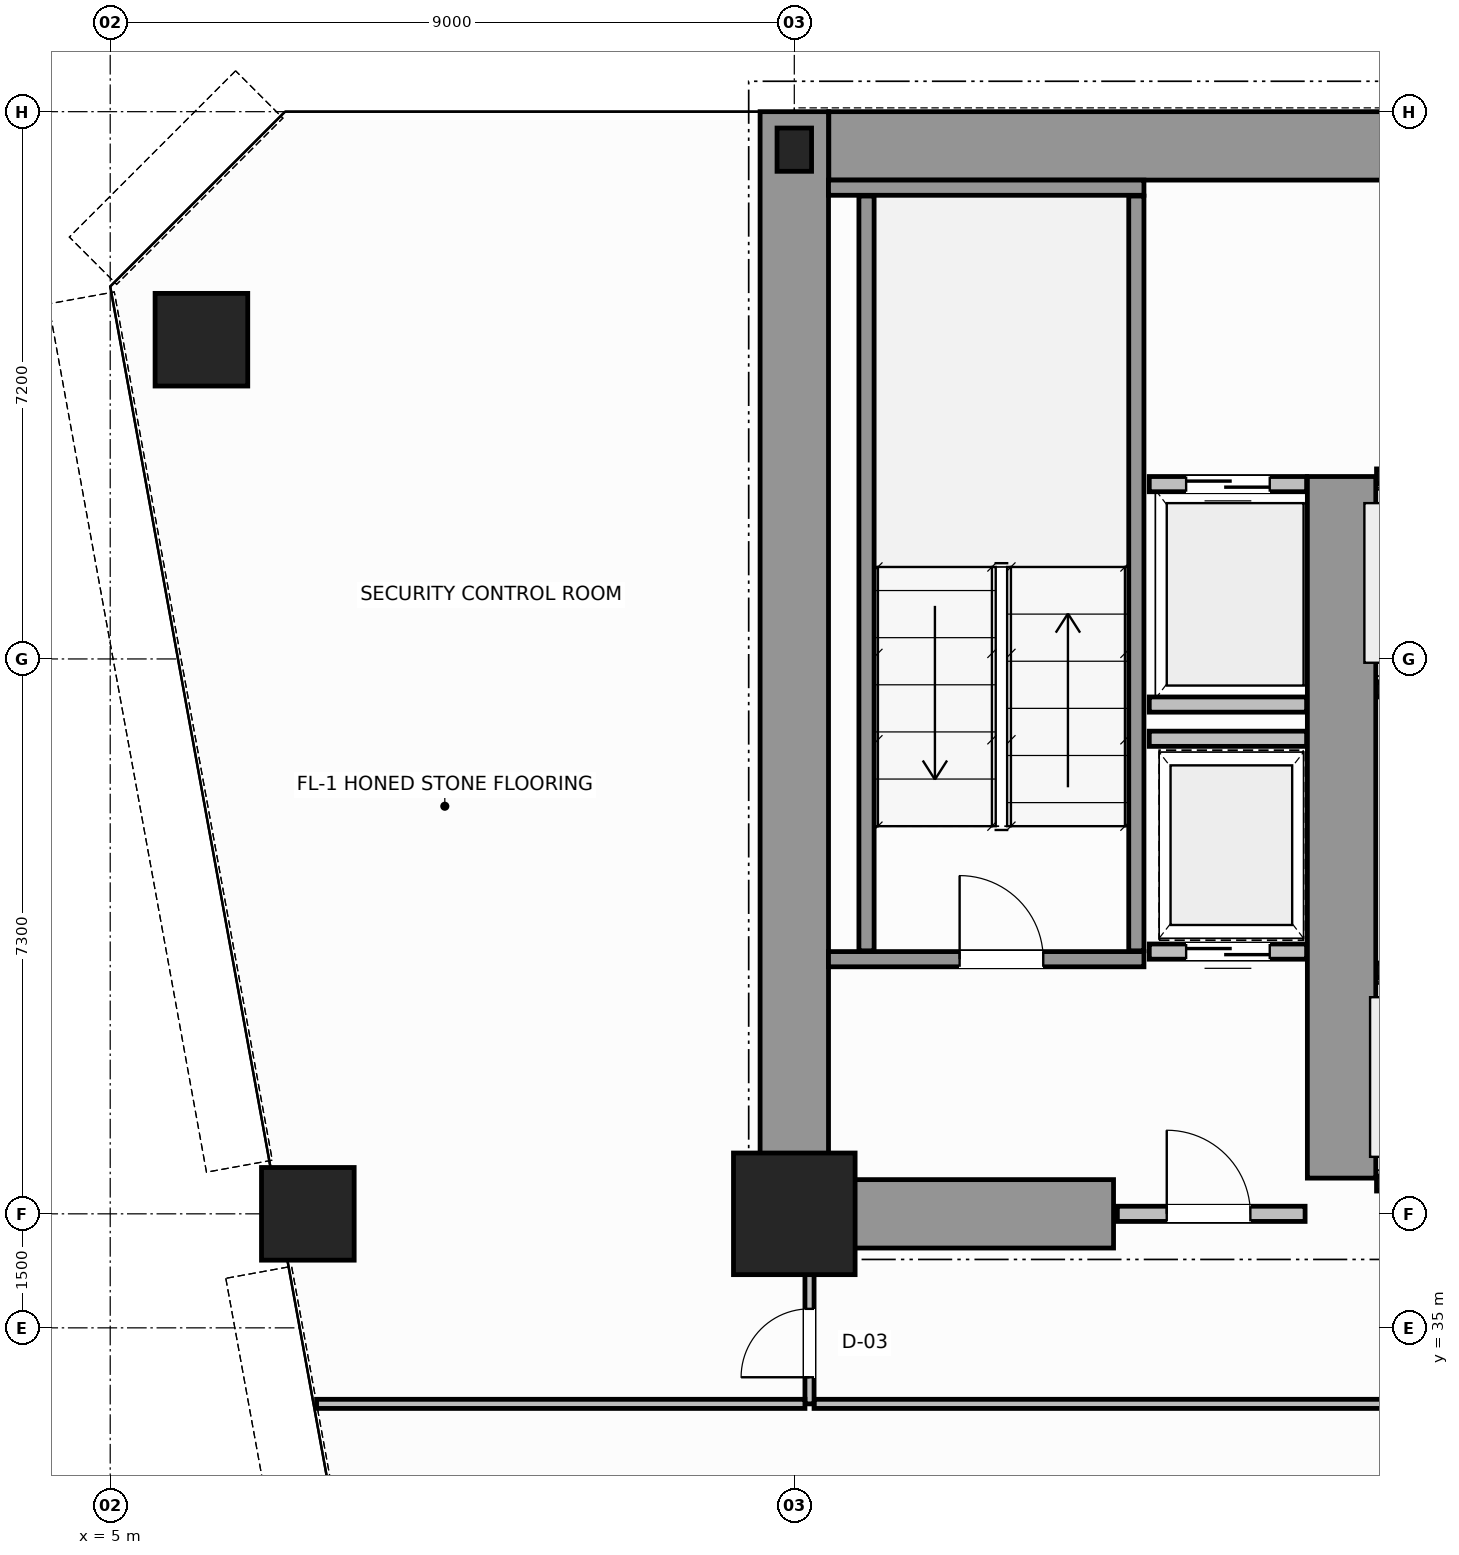
"""IFC4 building model, lengths in metres.
Left out: names, types, materials, properties, quantities, classifications, styles, units other than length and angle.
Written with IfcOpenShell. Run it as: python <this file> out.ifc"""

import sys

from ifc_helpers import new_model, si_unit, direction, frame, frame_2d, origin, origin_2d, place, context, subcontext, project, spatial, rectangle, hollow_circle, i_section, extrude, source, transform, mapped, element, fill, save


model = new_model("IFC4")
c1 = context("Model", 3, precision=1e-05, world=origin(), true_north=direction((0.0, 1.0)))
c2 = subcontext(c1, "Body", "Model", "MODEL_VIEW")
j1 = project(units=[si_unit("LENGTHUNIT", "METRE"), si_unit("PLANEANGLEUNIT", "RADIAN")], contexts=[c1])
p1 = place(None, origin())
s1 = spatial("IfcSite", under=j1, at=p1, CompositionType="ELEMENT")
p2 = place(p1, origin())
s2 = spatial("IfcBuilding", under=s1, at=p2, CompositionType="ELEMENT")
p3 = place(p2, frame((0.0, 0.0, 45.4)))
s3 = spatial("IfcBuildingStorey", under=s2, at=p3, CompositionType="ELEMENT", Elevation=45.4)
m1 = source(origin(), c2, "Body", "SweptSolid", [
    extrude(rectangle(XDim=1.6, YDim=1.6, at=origin_2d()), origin(), (0.0, 0.0, 1.0), 3.8),
])
p4 = place(p3, frame((14.0, 36.5, 0.0), z_axis=(0.0, 0.0, 1.0), x_axis=(1.0, 0.0, 0.0)))
e1 = element("IfcColumn", 1, at=p4, inside=s3, PredefinedType="COLUMN", context=c2, shape_type="MappedRepresentation", body=[
    mapped(m1, transform((0.0, 0.0, 0.0), scale=1.0)),
])
m2 = source(origin(), c2, "Body", "SweptSolid", [
    extrude(i_section(OverallWidth=0.454, OverallDepth=0.569, WebThickness=0.078, FlangeThickness=0.08, FilletRadius=0.015, at=origin_2d()), origin(), (0.0, 0.0, 1.0), 3.8),
])
p5 = place(p3, frame((14.0, 50.5, 0.0), z_axis=(0.0, 0.0, 1.0), x_axis=(1.0, 0.0, 0.0)))
e2 = element("IfcColumn", 2, at=p5, inside=s3, PredefinedType="COLUMN", context=c2, shape_type="MappedRepresentation", body=[
    mapped(m2, transform((0.0, 0.0, 0.0), scale=1.0)),
])
m3 = source(origin(), c2, "Body", "SweptSolid", [
    extrude(hollow_circle(Radius=0.61, WallThickness=0.05, at=origin_2d()), origin(), (0.0, 0.0, 1.0), 3.8),
])
for number, where, z_axis, x_axis in (
    (3, (6.2, 48.0, 0.0), (0.0, 0.0, 1.0), (1.0, 0.0, 0.0)),
    (4, (7.6, 36.5, 0.0), (0.0, 0.0, 1.0), (1.0, 0.0, 0.0)),
):
    element("IfcColumn", number, at=place(p3, frame(where, z_axis=z_axis, x_axis=x_axis)), inside=s3, PredefinedType="COLUMN", context=c2, shape_type="MappedRepresentation", body=[
        mapped(m3, transform((0.0, 0.0, 0.0), scale=1.0)),
    ])
p6 = place(p3, frame((14.454, 50.55, 0.0), z_axis=(0.0, 0.0, 1.0), x_axis=(1.0, 0.0, 0.0)))
e5 = element("IfcWall", 5, at=p6, inside=s3, PredefinedType="SHEAR", context=c2, shape_type="SweptSolid", body=[
    extrude(rectangle(XDim=19.544, YDim=0.9, at=frame_2d((9.772, 0.0))), origin(), (0.0, 0.0, 1.0), 3.8),
])
p7 = place(p3, frame((14.0, 36.5, 0.0), z_axis=(0.0, 0.0, 1.0), x_axis=(0.0, 1.0, 0.0)))
e6 = element("IfcWall", 6, at=p7, inside=s3, PredefinedType="SHEAR", context=c2, shape_type="SweptSolid", body=[
    extrude(rectangle(XDim=14.5, YDim=0.9, at=frame_2d((7.25, 0.0))), origin(), (0.0, 0.0, 1.0), 3.8),
])
p8 = place(p3, frame((14.47, 36.5, 0.0), z_axis=(0.0, 0.0, 1.0), x_axis=(1.0, 0.0, 0.0)))
e7 = element("IfcWall", 7, at=p8, inside=s3, PredefinedType="SHEAR", context=c2, shape_type="SweptSolid", body=[
    extrude(rectangle(XDim=3.73, YDim=0.9, at=frame_2d((1.865, 0.0))), origin(), (0.0, 0.0, 1.0), 2.38),
])
p9 = place(p3, frame((21.2, 36.97, 0.0), z_axis=(0.0, 0.0, 1.0), x_axis=(0.0, 1.0, 0.0)))
e8 = element("IfcWall", 8, at=p9, inside=s3, PredefinedType="SHEAR", context=c2, shape_type="SweptSolid", body=[
    extrude(rectangle(XDim=9.23, YDim=0.9, at=frame_2d((4.615, 0.0))), origin(), (0.0, 0.0, 1.0), 3.8),
])
p10 = place(p3, frame((14.45, 39.85, 0.0), z_axis=(0.0, 0.0, 1.0), x_axis=(1.0, 0.0, 0.0)))
e9 = element("IfcWall", 9, at=p10, inside=s3, PredefinedType="SOLIDWALL", context=c2, shape_type="SweptSolid", body=[
    extrude(rectangle(XDim=4.15, YDim=0.2, at=frame_2d((2.075, 0.0))), origin(), (0.0, 0.0, 1.0), 3.8),
])
p11 = place(p10, frame((1.725, 0.0, 0.0)))
e10 = element("IfcOpeningElement", 10, at=p11, cuts=e9, PredefinedType="OPENING", context=c2, shape_type="SweptSolid", body=[
    extrude(rectangle(XDim=1.1, YDim=2.15, at=frame_2d((0.55, 1.075))), frame((0.0, 0.11, 0.0), z_axis=(0.0, -1.0, 0.0), x_axis=(1.0, 0.0, 0.0)), (0.0, 0.0, 1.0), 0.22),
])
p12 = place(p3, frame((14.45, 50.0, 0.0), z_axis=(0.0, 0.0, 1.0), x_axis=(1.0, 0.0, 0.0)))
e11 = element("IfcWall", 11, at=p12, inside=s3, PredefinedType="SOLIDWALL", context=c2, shape_type="SweptSolid", body=[
    extrude(rectangle(XDim=4.15, YDim=0.2, at=frame_2d((2.075, 0.0))), origin(), (0.0, 0.0, 1.0), 3.8),
])
for number, where, z_axis, x_axis in (
    (12, (14.95, 39.96, 0.0), (0.0, 0.0, 1.0), (0.0, 1.0, 0.0)),
    (13, (18.5, 39.96, 0.0), (0.0, 0.0, 1.0), (0.0, 1.0, 0.0)),
):
    element("IfcWall", number, at=place(p3, frame(where, z_axis=z_axis, x_axis=x_axis)), inside=s3, PredefinedType="SOLIDWALL", context=c2, shape_type="SweptSolid", body=[
        extrude(rectangle(XDim=9.93, YDim=0.2, at=frame_2d((4.965, 0.0))), origin(), (0.0, 0.0, 1.0), 3.8),
    ])
p13 = place(p3, frame((18.25, 36.5, 0.0), z_axis=(0.0, 0.0, 1.0), x_axis=(1.0, 0.0, 0.0)))
e14 = element("IfcWall", 14, at=p13, inside=s3, PredefinedType="SOLIDWALL", context=c2, shape_type="SweptSolid", body=[
    extrude(rectangle(XDim=2.47, YDim=0.2, at=frame_2d((1.235, 0.0))), origin(), (0.0, 0.0, 1.0), 2.37),
])
p14 = place(p13, frame((0.65, 0.0, 0.0)))
e15 = element("IfcOpeningElement", 15, at=p14, cuts=e14, PredefinedType="OPENING", context=c2, shape_type="SweptSolid", body=[
    extrude(rectangle(XDim=1.1, YDim=2.15, at=frame_2d((0.55, 1.075))), frame((0.0, 0.11, 0.0), z_axis=(0.0, -1.0, 0.0), x_axis=(1.0, 0.0, 0.0)), (0.0, 0.0, 1.0), 0.22),
])
p15 = place(p3, frame((21.66, 39.7, 0.0), z_axis=(0.0, 0.0, 1.0), x_axis=(1.0, 0.0, 0.0)))
e16 = element("IfcWall", 16, at=p15, inside=s3, PredefinedType="SOLIDWALL", context=c2, shape_type="SweptSolid", body=[
    extrude(rectangle(XDim=1.77, YDim=0.2, at=frame_2d((0.885, 0.0))), origin(), (0.0, 0.0, 1.0), 3.58),
])
p16 = place(p15, frame((0.335, 0.0, 0.0)))
e17 = element("IfcOpeningElement", 17, at=p16, cuts=e16, PredefinedType="OPENING", context=c2, shape_type="SweptSolid", body=[
    extrude(rectangle(XDim=1.1, YDim=2.15, at=frame_2d((0.55, 1.075))), frame((0.0, 0.11, 0.0), z_axis=(0.0, -1.0, 0.0), x_axis=(1.0, 0.0, 0.0)), (0.0, 0.0, 1.0), 0.22),
])
p17 = place(p3, frame((21.66, 36.9, 0.0), z_axis=(0.0, 0.0, 1.0), x_axis=(1.0, 0.0, 0.0)))
e18 = element("IfcWall", 18, at=p17, inside=s3, PredefinedType="SOLIDWALL", context=c2, shape_type="SweptSolid", body=[
    extrude(rectangle(XDim=1.77, YDim=0.2, at=frame_2d((0.885, 0.0))), origin(), (0.0, 0.0, 1.0), 2.37),
])
p18 = place(p3, frame((21.66, 43.4, 0.0), z_axis=(0.0, 0.0, 1.0), x_axis=(1.0, 0.0, 0.0)))
e19 = element("IfcWall", 19, at=p18, inside=s3, PredefinedType="SOLIDWALL", context=c2, shape_type="SweptSolid", body=[
    extrude(rectangle(XDim=1.65, YDim=0.2, at=frame_2d((0.825, 0.0))), origin(), (0.0, 0.0, 1.0), 3.58),
])
p19 = place(p18, frame((0.275, 0.0, 0.0)))
e20 = element("IfcOpeningElement", 20, at=p19, cuts=e19, PredefinedType="OPENING", context=c2, shape_type="SweptSolid", body=[
    extrude(rectangle(XDim=1.1, YDim=2.15, at=frame_2d((0.55, 1.075))), frame((0.0, 0.11, 0.0), z_axis=(0.0, -1.0, 0.0), x_axis=(1.0, 0.0, 0.0)), (0.0, 0.0, 1.0), 0.22),
])
p20 = place(p3, frame((21.66, 46.2, 0.0), z_axis=(0.0, 0.0, 1.0), x_axis=(1.0, 0.0, 0.0)))
e21 = element("IfcWall", 21, at=p20, inside=s3, PredefinedType="SOLIDWALL", context=c2, shape_type="SweptSolid", body=[
    extrude(rectangle(XDim=1.65, YDim=0.2, at=frame_2d((0.825, 0.0))), origin(), (0.0, 0.0, 1.0), 3.58),
])
p21 = place(p3, frame((18.67, 46.1, 0.0), z_axis=(0.0, 0.0, 1.0), x_axis=(1.0, 0.0, 0.0)))
e22 = element("IfcWall", 22, at=p21, inside=s3, PredefinedType="SOLIDWALL", context=c2, shape_type="SweptSolid", body=[
    extrude(rectangle(XDim=2.07, YDim=0.2, at=frame_2d((1.035, 0.0))), origin(), (0.0, 0.0, 1.0), 3.58),
])
p22 = place(p21, frame((0.485, 0.0, 0.0)))
e23 = element("IfcOpeningElement", 23, at=p22, cuts=e22, PredefinedType="OPENING", context=c2, shape_type="SweptSolid", body=[
    extrude(rectangle(XDim=1.1, YDim=2.15, at=frame_2d((0.55, 1.075))), frame((0.0, 0.11, 0.0), z_axis=(0.0, -1.0, 0.0), x_axis=(1.0, 0.0, 0.0)), (0.0, 0.0, 1.0), 0.22),
])
p23 = place(p3, frame((18.67, 43.2, 0.0), z_axis=(0.0, 0.0, 1.0), x_axis=(1.0, 0.0, 0.0)))
e24 = element("IfcWall", 24, at=p23, inside=s3, PredefinedType="SOLIDWALL", context=c2, shape_type="SweptSolid", body=[
    extrude(rectangle(XDim=2.07, YDim=0.2, at=frame_2d((1.035, 0.0))), origin(), (0.0, 0.0, 1.0), 3.58),
])
p24 = place(p3, frame((18.67, 39.95, 0.0), z_axis=(0.0, 0.0, 1.0), x_axis=(1.0, 0.0, 0.0)))
e25 = element("IfcWall", 25, at=p24, inside=s3, PredefinedType="SOLIDWALL", context=c2, shape_type="SweptSolid", body=[
    extrude(rectangle(XDim=2.07, YDim=0.2, at=frame_2d((1.035, 0.0))), origin(), (0.0, 0.0, 1.0), 3.58),
])
p25 = place(p24, frame((0.485, 0.0, 0.0)))
e26 = element("IfcOpeningElement", 26, at=p25, cuts=e25, PredefinedType="OPENING", context=c2, shape_type="SweptSolid", body=[
    extrude(rectangle(XDim=1.1, YDim=2.15, at=frame_2d((0.55, 1.075))), frame((0.0, 0.11, 0.0), z_axis=(0.0, -1.0, 0.0), x_axis=(1.0, 0.0, 0.0)), (0.0, 0.0, 1.0), 0.22),
])
p26 = place(p3, frame((18.67, 42.75, 0.0), z_axis=(0.0, 0.0, 1.0), x_axis=(1.0, 0.0, 0.0)))
e27 = element("IfcWall", 27, at=p26, inside=s3, PredefinedType="SOLIDWALL", context=c2, shape_type="SweptSolid", body=[
    extrude(rectangle(XDim=2.07, YDim=0.2, at=frame_2d((1.035, 0.0))), origin(), (0.0, 0.0, 1.0), 3.58),
])
p27 = place(p3, frame((14.26, 34.0, 0.0), z_axis=(0.0, 0.0, 1.0), x_axis=(1.0, 0.0, 0.0)))
e28 = element("IfcWall", 28, at=p27, inside=s3, PredefinedType="PARTITIONING", context=c2, shape_type="SweptSolid", body=[
    extrude(rectangle(XDim=12.88, YDim=0.12, at=frame_2d((6.44, 0.0))), origin(), (0.0, 0.0, 1.0), 3.02),
])
p28 = place(p3, frame((14.2, 34.0, 0.0), z_axis=(0.0, 0.0, 1.0), x_axis=(0.0, 1.0, 0.0)))
e29 = element("IfcWall", 29, at=p28, inside=s3, PredefinedType="PARTITIONING", context=c2, shape_type="SweptSolid", body=[
    extrude(rectangle(XDim=2.44, YDim=0.12, at=frame_2d((1.22, 0.0))), origin(), (0.0, 0.0, 1.0), 3.58),
])
p29 = place(p28, frame((0.35, 0.0, 0.0)))
e30 = element("IfcOpeningElement", 30, at=p29, cuts=e29, PredefinedType="OPENING", context=c2, shape_type="SweptSolid", body=[
    extrude(rectangle(XDim=0.9, YDim=2.15, at=frame_2d((0.45, 1.075))), frame((0.0, 0.07, 0.0), z_axis=(0.0, -1.0, 0.0), x_axis=(1.0, 0.0, 0.0)), (0.0, 0.0, 1.0), 0.14),
])
p30 = place(p3, frame((7.715, 34.0, 0.0), z_axis=(0.0, 0.0, 1.0), x_axis=(1.0, 0.0, 0.0)))
e31 = element("IfcWall", 31, at=p30, inside=s3, PredefinedType="PARTITIONING", context=c2, shape_type="SweptSolid", body=[
    extrude(rectangle(XDim=6.425, YDim=0.12, at=frame_2d((3.212, 0.0))), origin(), (0.0, 0.0, 1.0), 3.02),
])
m4 = source(origin(), c2, "Body", "SweptSolid", [
    extrude(rectangle(XDim=1.1, YDim=2.15, at=frame_2d((0.55, 1.075))), frame((0.0, 0.025, 0.0), z_axis=(0.0, -1.0, 0.0), x_axis=(1.0, 0.0, 0.0)), (0.0, 0.0, 1.0), 0.05),
])
p31 = place(p11, origin())
e32 = element("IfcDoor", 32, at=p31, inside=s3, OperationType="SINGLE_SWING_LEFT", PredefinedType="DOOR", context=c2, shape_type="MappedRepresentation", body=[
    mapped(m4, transform((0.0, 0.0, 0.0), scale=1.0)),
])
fill(e10, e32)
p32 = place(p14, origin())
e33 = element("IfcDoor", 33, at=p32, inside=s3, OperationType="SINGLE_SWING_RIGHT", PredefinedType="DOOR", context=c2, shape_type="MappedRepresentation", body=[
    mapped(m4, transform((0.0, 0.0, 0.0), scale=1.0)),
])
fill(e15, e33)
p33 = place(p22, origin())
e34 = element("IfcDoor", 34, at=p33, inside=s3, OperationType="DOUBLE_DOOR_SLIDING", PredefinedType="DOOR", context=c2, shape_type="MappedRepresentation", body=[
    mapped(m4, transform((0.0, 0.0, 0.0), scale=1.0)),
])
fill(e23, e34)
p34 = place(p25, origin())
e35 = element("IfcDoor", 35, at=p34, inside=s3, OperationType="DOUBLE_DOOR_SLIDING", PredefinedType="DOOR", context=c2, shape_type="MappedRepresentation", body=[
    mapped(m4, transform((0.0, 0.0, 0.0), scale=1.0)),
])
fill(e26, e35)
m5 = source(origin(), c2, "Body", "SweptSolid", [
    extrude(rectangle(XDim=0.9, YDim=2.15, at=frame_2d((0.45, 1.075))), frame((0.0, 0.025, 0.0), z_axis=(0.0, -1.0, 0.0), x_axis=(1.0, 0.0, 0.0)), (0.0, 0.0, 1.0), 0.05),
])
p35 = place(p29, origin())
e36 = element("IfcDoor", 36, at=p35, inside=s3, OperationType="SINGLE_SWING_LEFT", PredefinedType="DOOR", context=c2, shape_type="MappedRepresentation", body=[
    mapped(m5, transform((0.0, 0.0, 0.0), scale=1.0)),
])
fill(e30, e36)
save(model, sys.argv[1])
